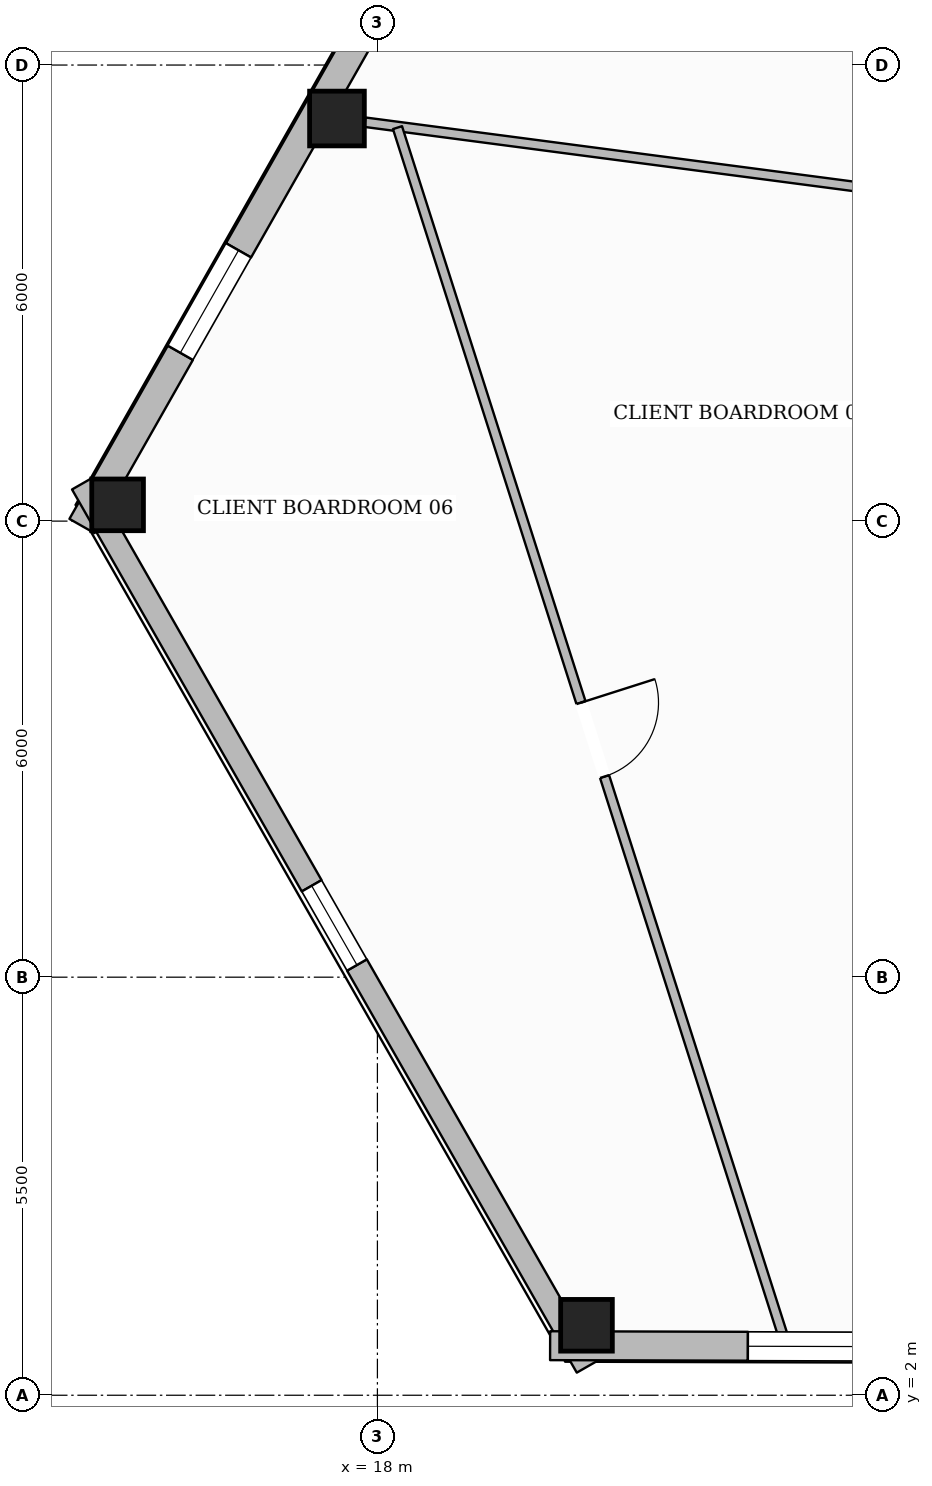
"""IFC4 building model, lengths in metres.
Left out: names, types, materials, properties, quantities, classifications, styles, units other than length and angle.
Written with IfcOpenShell. Run it as: python <this file> out.ifc"""

import sys

from ifc_helpers import new_model, si_unit, direction, frame, frame_2d, origin, origin_2d, place, context, subcontext, project, spatial, rectangle, hollow_rectangle, extrude, element, fill, save


model = new_model("IFC4")
c1 = context("Model", 3, precision=1e-05, world=origin(), true_north=direction((0.0, 1.0)))
c2 = subcontext(c1, "Body", "Model", "MODEL_VIEW")
j1 = project(units=[si_unit("LENGTHUNIT", "METRE"), si_unit("PLANEANGLEUNIT", "RADIAN")], contexts=[c1])
p1 = place(None, origin())
s1 = spatial("IfcSite", under=j1, at=p1, CompositionType="ELEMENT")
p2 = place(p1, origin())
s2 = spatial("IfcBuilding", under=s1, at=p2, CompositionType="ELEMENT")
p3 = place(p2, frame((0.0, 0.0, 97.05)))
s3 = spatial("IfcBuildingStorey", under=s2, at=p3, CompositionType="ELEMENT", Elevation=97.05)
p4 = place(p3, frame((17.468, 18.796, 0.0), z_axis=(0.0, 0.0, 1.0), x_axis=(1.0, 0.0, 0.0)))
e1 = element("IfcColumn", 1, at=p4, inside=s3, PredefinedType="COLUMN", context=c2, shape_type="SweptSolid", body=[
    extrude(hollow_rectangle(XDim=0.72, YDim=0.72, WallThickness=0.032, at=origin_2d()), origin(), (0.0, 0.0, 1.0), 3.6),
])
for number, where, z_axis, x_axis in (
    (2, (14.582, 13.714, 0.0), (0.0, 0.0, 1.0), (1.0, 0.0, 0.0)),
    (3, (20.751, 2.92, 0.0), (0.0, 0.0, 1.0), (1.0, 0.0, 0.0)),
):
    element("IfcColumn", number, at=place(p3, frame(where, z_axis=z_axis, x_axis=x_axis)), inside=s3, PredefinedType="COLUMN", context=c2, shape_type="SweptSolid", body=[
        extrude(hollow_rectangle(XDim=0.68, YDim=0.68, WallThickness=0.03, at=origin_2d()), origin(), (0.0, 0.0, 1.0), 3.6),
    ])
p5 = place(p3, frame((14.113, 13.436, 0.0), z_axis=(0.0, 0.0, 1.0), x_axis=(0.493785476093, 0.869583753068, 0.0)))
e4 = element("IfcWall", 4, at=p5, inside=s3, PredefinedType="STANDARD", context=c2, shape_type="SweptSolid", body=[
    extrude(rectangle(XDim=36.023, YDim=0.38, at=frame_2d((18.011, 0.0))), origin(), (0.0, 0.0, 1.0), 3.059),
])
p6 = place(p5, frame((26.417, 0.0, 0.0)))
e5 = element("IfcOpeningElement", 5, at=p6, cuts=e4, PredefinedType="OPENING", context=c2, shape_type="SweptSolid", body=[
    extrude(rectangle(XDim=1.0, YDim=2.2, at=frame_2d((0.5, 1.1))), frame((0.0, 0.2, 0.0), z_axis=(0.0, -1.0, 0.0), x_axis=(1.0, 0.0, 0.0)), (0.0, 0.0, 1.0), 0.4),
])
p7 = place(p5, frame((31.845, 0.0, 0.65)))
e6 = element("IfcOpeningElement", 6, at=p7, cuts=e4, PredefinedType="OPENING", context=c2, shape_type="SweptSolid", body=[
    extrude(rectangle(XDim=1.55, YDim=1.75, at=frame_2d((0.775, 0.875))), frame((0.0, 0.2, 0.0), z_axis=(0.0, -1.0, 0.0), x_axis=(1.0, 0.0, 0.0)), (0.0, 0.0, 1.0), 0.4),
])
p8 = place(p5, frame((20.156, 0.0, 0.65)))
e7 = element("IfcOpeningElement", 7, at=p8, cuts=e4, PredefinedType="OPENING", context=c2, shape_type="SweptSolid", body=[
    extrude(rectangle(XDim=1.55, YDim=1.75, at=frame_2d((0.775, 0.875))), frame((0.0, 0.2, 0.0), z_axis=(0.0, -1.0, 0.0), x_axis=(1.0, 0.0, 0.0)), (0.0, 0.0, 1.0), 0.4),
])
p9 = place(p5, frame((8.466, 0.0, 0.65)))
e8 = element("IfcOpeningElement", 8, at=p9, cuts=e4, PredefinedType="OPENING", context=c2, shape_type="SweptSolid", body=[
    extrude(rectangle(XDim=1.55, YDim=1.75, at=frame_2d((0.775, 0.875))), frame((0.0, 0.2, 0.0), z_axis=(0.0, -1.0, 0.0), x_axis=(1.0, 0.0, 0.0)), (0.0, 0.0, 1.0), 0.4),
])
p10 = place(p5, frame((2.621, 0.0, 0.65)))
e9 = element("IfcOpeningElement", 9, at=p10, cuts=e4, PredefinedType="OPENING", context=c2, shape_type="SweptSolid", body=[
    extrude(rectangle(XDim=1.55, YDim=1.75, at=frame_2d((0.775, 0.875))), frame((0.0, 0.2, 0.0), z_axis=(0.0, -1.0, 0.0), x_axis=(1.0, 0.0, 0.0)), (0.0, 0.0, 1.0), 0.4),
])
p11 = place(p3, frame((20.753, 2.372, 0.0), z_axis=(0.0, 0.0, 1.0), x_axis=(-0.496215555128, 0.868199356628, 0.0)))
e10 = element("IfcWall", 10, at=p11, inside=s3, PredefinedType="STANDARD", context=c2, shape_type="SweptSolid", body=[
    extrude(rectangle(XDim=13.383, YDim=0.3, at=frame_2d((6.691, 0.0))), origin(), (0.0, 0.0, 1.0), 3.059),
])
p12 = place(p11, frame((6.092, 0.0, 0.65)))
e11 = element("IfcOpeningElement", 11, at=p12, cuts=e10, PredefinedType="OPENING", context=c2, shape_type="SweptSolid", body=[
    extrude(rectangle(XDim=1.2, YDim=1.7, at=frame_2d((0.6, 0.85))), frame((0.0, 0.16, 0.0), z_axis=(0.0, -1.0, 0.0), x_axis=(1.0, 0.0, 0.0)), (0.0, 0.0, 1.0), 0.32),
])
p13 = place(p3, frame((56.023, 2.552, 0.0), z_axis=(0.0, 0.0, 1.0), x_axis=(-0.999996099517, 0.002793018142, 0.0)))
e12 = element("IfcWall", 12, at=p13, inside=s3, PredefinedType="STANDARD", context=c2, shape_type="SweptSolid", body=[
    extrude(rectangle(XDim=35.751, YDim=0.38, at=frame_2d((17.875, 0.0))), origin(), (0.0, 0.0, 1.0), 3.059),
])
p14 = place(p13, frame((26.213, 0.0, 0.0)))
e13 = element("IfcOpeningElement", 13, at=p14, cuts=e12, PredefinedType="OPENING", context=c2, shape_type="SweptSolid", body=[
    extrude(rectangle(XDim=1.0, YDim=2.2, at=frame_2d((0.5, 1.1))), frame((0.0, 0.2, 0.0), z_axis=(0.0, -1.0, 0.0), x_axis=(1.0, 0.0, 0.0)), (0.0, 0.0, 1.0), 0.4),
])
p15 = place(p13, frame((31.599, 0.0, 0.65)))
e14 = element("IfcOpeningElement", 14, at=p15, cuts=e12, PredefinedType="OPENING", context=c2, shape_type="SweptSolid", body=[
    extrude(rectangle(XDim=1.55, YDim=1.75, at=frame_2d((0.775, 0.875))), frame((0.0, 0.2, 0.0), z_axis=(0.0, -1.0, 0.0), x_axis=(1.0, 0.0, 0.0)), (0.0, 0.0, 1.0), 0.4),
])
p16 = place(p13, frame((20.001, 0.0, 0.65)))
e15 = element("IfcOpeningElement", 15, at=p16, cuts=e12, PredefinedType="OPENING", context=c2, shape_type="SweptSolid", body=[
    extrude(rectangle(XDim=1.55, YDim=1.75, at=frame_2d((0.775, 0.875))), frame((0.0, 0.2, 0.0), z_axis=(0.0, -1.0, 0.0), x_axis=(1.0, 0.0, 0.0)), (0.0, 0.0, 1.0), 0.4),
])
p17 = place(p13, frame((8.404, 0.0, 0.65)))
e16 = element("IfcOpeningElement", 16, at=p17, cuts=e12, PredefinedType="OPENING", context=c2, shape_type="SweptSolid", body=[
    extrude(rectangle(XDim=1.55, YDim=1.75, at=frame_2d((0.775, 0.875))), frame((0.0, 0.2, 0.0), z_axis=(0.0, -1.0, 0.0), x_axis=(1.0, 0.0, 0.0)), (0.0, 0.0, 1.0), 0.4),
])
p18 = place(p13, frame((2.605, 0.0, 0.65)))
e17 = element("IfcOpeningElement", 17, at=p18, cuts=e12, PredefinedType="OPENING", context=c2, shape_type="SweptSolid", body=[
    extrude(rectangle(XDim=1.55, YDim=1.75, at=frame_2d((0.775, 0.875))), frame((0.0, 0.2, 0.0), z_axis=(0.0, -1.0, 0.0), x_axis=(1.0, 0.0, 0.0)), (0.0, 0.0, 1.0), 0.4),
])
p19 = place(p3, frame((25.949, 17.683, 0.0), z_axis=(0.0, 0.0, 1.0), x_axis=(-0.991488077313, 0.130197513598, 0.0)))
e18 = element("IfcWall", 18, at=p19, inside=s3, PredefinedType="PARTITIONING", context=c2, shape_type="SweptSolid", body=[
    extrude(rectangle(XDim=8.183, YDim=0.125, at=frame_2d((4.092, 0.0))), origin(), (0.0, 0.0, 1.0), 3.141),
])
p20 = place(p3, frame((18.264, 18.677, 0.0), z_axis=(0.0, 0.0, 1.0), x_axis=(0.303993518428, -0.95267409997, 0.0)))
e19 = element("IfcWall", 19, at=p20, inside=s3, PredefinedType="PARTITIONING", context=c2, shape_type="SweptSolid", body=[
    extrude(rectangle(XDim=16.673, YDim=0.125, at=frame_2d((8.336, 0.0))), origin(), (0.0, 0.0, 1.0), 3.288),
])
p21 = place(p20, frame((7.941, 0.0, 0.0)))
e20 = element("IfcOpeningElement", 20, at=p21, cuts=e19, PredefinedType="OPENING", context=c2, shape_type="SweptSolid", body=[
    extrude(rectangle(XDim=1.02, YDim=2.15, at=frame_2d((0.51, 1.075))), frame((0.0, 0.073, 0.0), z_axis=(0.0, -1.0, 0.0), x_axis=(1.0, 0.0, 0.0)), (0.0, 0.0, 1.0), 0.145),
])
p22 = place(p10, origin())
e21 = element("IfcWindow", 21, at=p22, inside=s3, PartitioningType="SINGLE_PANEL", PredefinedType="WINDOW", context=c2, shape_type="SweptSolid", body=[
    extrude(rectangle(XDim=1.55, YDim=1.75, at=frame_2d((0.775, 0.875))), frame((0.0, 0.03, 0.0), z_axis=(0.0, -1.0, 0.0), x_axis=(1.0, 0.0, 0.0)), (0.0, 0.0, 1.0), 0.06),
])
fill(e9, e21)
p23 = place(p15, origin())
e22 = element("IfcWindow", 22, at=p23, inside=s3, PartitioningType="SINGLE_PANEL", PredefinedType="WINDOW", context=c2, shape_type="SweptSolid", body=[
    extrude(rectangle(XDim=1.55, YDim=1.75, at=frame_2d((0.775, 0.875))), frame((0.0, 0.03, 0.0), z_axis=(0.0, -1.0, 0.0), x_axis=(1.0, 0.0, 0.0)), (0.0, 0.0, 1.0), 0.06),
])
fill(e14, e22)
p24 = place(p12, origin())
e23 = element("IfcWindow", 23, at=p24, inside=s3, PartitioningType="SINGLE_PANEL", PredefinedType="WINDOW", context=c2, shape_type="SweptSolid", body=[
    extrude(rectangle(XDim=1.2, YDim=1.7, at=frame_2d((0.6, 0.85))), frame((0.0, 0.03, 0.0), z_axis=(0.0, -1.0, 0.0), x_axis=(1.0, 0.0, 0.0)), (0.0, 0.0, 1.0), 0.06),
])
fill(e11, e23)
p25 = place(p21, origin())
e24 = element("IfcDoor", 24, at=p25, inside=s3, OperationType="SINGLE_SWING_LEFT", PredefinedType="DOOR", context=c2, shape_type="SweptSolid", body=[
    extrude(rectangle(XDim=1.02, YDim=2.15, at=frame_2d((0.51, 1.075))), frame((0.0, 0.025, 0.0), z_axis=(0.0, -1.0, 0.0), x_axis=(1.0, 0.0, 0.0)), (0.0, 0.0, 1.0), 0.05),
])
fill(e20, e24)
save(model, sys.argv[1])
